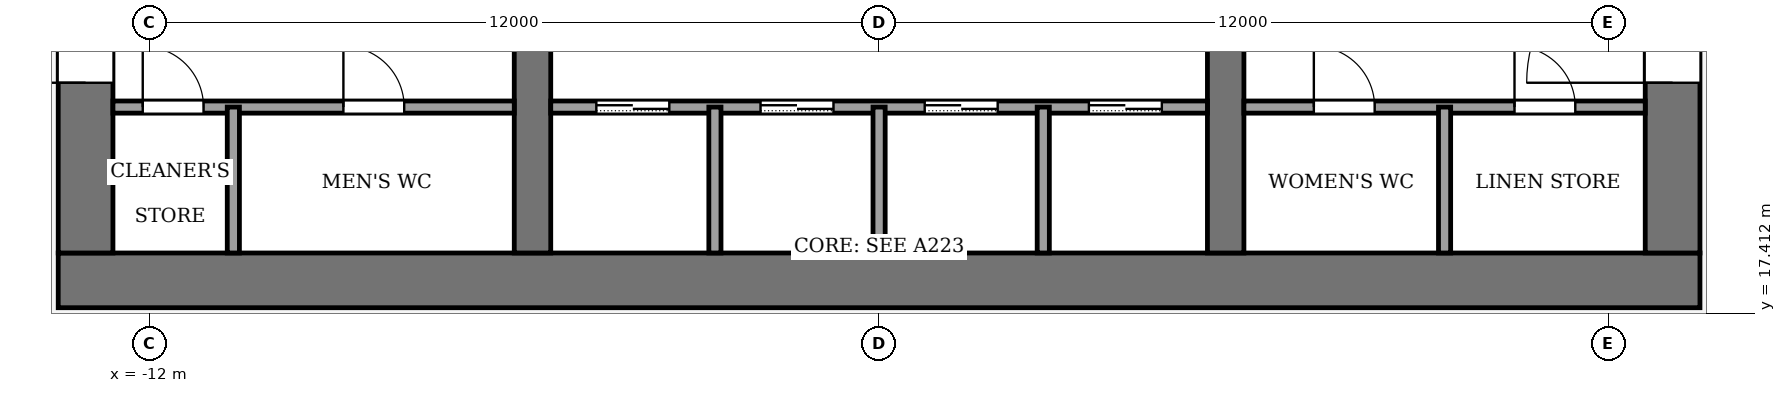
"""IFC4 building model, lengths in metres.
Left out: names, types, materials, properties, quantities, classifications, styles, units other than length and angle.
Written with IfcOpenShell. Run it as: python <this file> out.ifc"""

import sys

from ifc_helpers import new_model, si_unit, direction, frame, frame_2d, origin, place, context, subcontext, project, spatial, rectangle, extrude, element, fill, save


model = new_model("IFC4")
c1 = context("Model", 3, precision=1e-05, world=origin(), true_north=direction((0.0, 1.0)))
c2 = subcontext(c1, "Body", "Model", "MODEL_VIEW")
j1 = project(units=[si_unit("LENGTHUNIT", "METRE"), si_unit("PLANEANGLEUNIT", "RADIAN")], contexts=[c1])
p1 = place(None, origin())
s1 = spatial("IfcSite", under=j1, at=p1, CompositionType="ELEMENT")
p2 = place(p1, origin())
s2 = spatial("IfcBuilding", under=s1, at=p2, CompositionType="ELEMENT")
p3 = place(p2, frame((0.0, 0.0, 214.0)))
s3 = spatial("IfcBuildingStorey", under=s2, at=p3, CompositionType="ELEMENT", Elevation=214.0)
p4 = place(p3, frame((-13.5, 17.95, -0.13), z_axis=(0.0, 0.0, 1.0), x_axis=(1.0, 0.0, 0.0)))
e1 = element("IfcWall", 1, at=p4, inside=s3, PredefinedType="SHEAR", context=c2, shape_type="SweptSolid", body=[
    extrude(rectangle(XDim=27.0, YDim=0.9, at=frame_2d((13.5, 0.0))), origin(), (0.0, 0.0, 1.0), 4.0),
])
p5 = place(p3, frame((-13.05, 18.4, -0.13), z_axis=(0.0, 0.0, 1.0), x_axis=(0.0, 1.0, 0.0)))
e2 = element("IfcWall", 2, at=p5, inside=s3, PredefinedType="SHEAR", context=c2, shape_type="SweptSolid", body=[
    extrude(rectangle(XDim=19.2, YDim=0.9, at=frame_2d((9.6, 0.0))), origin(), (0.0, 0.0, 1.0), 4.0),
])
p6 = place(p5, frame((2.8, 0.0, 0.13)))
e3 = element("IfcOpeningElement", 3, at=p6, cuts=e2, PredefinedType="OPENING", context=c2, shape_type="SweptSolid", body=[
    extrude(rectangle(XDim=2.4, YDim=2.4, at=frame_2d((1.2, 1.2))), frame((0.0, 0.46, 0.0), z_axis=(0.0, -1.0, 0.0), x_axis=(1.0, 0.0, 0.0)), (0.0, 0.0, 1.0), 0.92),
])
p7 = place(p5, frame((13.4, 0.0, 0.13)))
e4 = element("IfcOpeningElement", 4, at=p7, cuts=e2, PredefinedType="OPENING", context=c2, shape_type="SweptSolid", body=[
    extrude(rectangle(XDim=1.4, YDim=2.2, at=frame_2d((0.7, 1.1))), frame((0.0, 0.46, 0.0), z_axis=(0.0, -1.0, 0.0), x_axis=(1.0, 0.0, 0.0)), (0.0, 0.0, 1.0), 0.92),
])
p8 = place(p3, frame((13.05, 18.4, -0.13), z_axis=(0.0, 0.0, 1.0), x_axis=(0.0, 1.0, 0.0)))
e5 = element("IfcWall", 5, at=p8, inside=s3, PredefinedType="SHEAR", context=c2, shape_type="SweptSolid", body=[
    extrude(rectangle(XDim=19.2, YDim=0.9, at=frame_2d((9.6, 0.0))), origin(), (0.0, 0.0, 1.0), 4.0),
])
p9 = place(p8, frame((2.8, 0.0, 0.13)))
e6 = element("IfcOpeningElement", 6, at=p9, cuts=e5, PredefinedType="OPENING", context=c2, shape_type="SweptSolid", body=[
    extrude(rectangle(XDim=2.4, YDim=2.4, at=frame_2d((1.2, 1.2))), frame((0.0, 0.46, 0.0), z_axis=(0.0, -1.0, 0.0), x_axis=(1.0, 0.0, 0.0)), (0.0, 0.0, 1.0), 0.92),
])
p10 = place(p8, frame((13.3, 0.0, 0.13)))
e7 = element("IfcOpeningElement", 7, at=p10, cuts=e5, PredefinedType="OPENING", context=c2, shape_type="SweptSolid", body=[
    extrude(rectangle(XDim=2.4, YDim=2.4, at=frame_2d((1.2, 1.2))), frame((0.0, 0.46, 0.0), z_axis=(0.0, -1.0, 0.0), x_axis=(1.0, 0.0, 0.0)), (0.0, 0.0, 1.0), 0.92),
])
p11 = place(p3, frame((-5.7, 18.4, -0.13), z_axis=(0.0, 0.0, 1.0), x_axis=(0.0, 1.0, 0.0)))
e8 = element("IfcWall", 8, at=p11, inside=s3, PredefinedType="SHEAR", context=c2, shape_type="SweptSolid", body=[
    extrude(rectangle(XDim=19.2, YDim=0.6, at=frame_2d((9.6, 0.0))), origin(), (0.0, 0.0, 1.0), 4.0),
])
p12 = place(p11, frame((8.35, 0.0, 0.13)))
e9 = element("IfcOpeningElement", 9, at=p12, cuts=e8, PredefinedType="OPENING", context=c2, shape_type="SweptSolid", body=[
    extrude(rectangle(XDim=0.9, YDim=2.1, at=frame_2d((0.45, 1.05))), frame((0.0, 0.31, 0.0), z_axis=(0.0, -1.0, 0.0), x_axis=(1.0, 0.0, 0.0)), (0.0, 0.0, 1.0), 0.62),
])
p13 = place(p3, frame((5.7, 18.4, -0.13), z_axis=(0.0, 0.0, 1.0), x_axis=(0.0, 1.0, 0.0)))
e10 = element("IfcWall", 10, at=p13, inside=s3, PredefinedType="SHEAR", context=c2, shape_type="SweptSolid", body=[
    extrude(rectangle(XDim=19.2, YDim=0.6, at=frame_2d((9.6, 0.0))), origin(), (0.0, 0.0, 1.0), 4.0),
])
p14 = place(p13, frame((13.3, 0.0, 0.13)))
e11 = element("IfcOpeningElement", 11, at=p14, cuts=e10, PredefinedType="OPENING", context=c2, shape_type="SweptSolid", body=[
    extrude(rectangle(XDim=2.4, YDim=2.4, at=frame_2d((1.2, 1.2))), frame((0.0, 0.31, 0.0), z_axis=(0.0, -1.0, 0.0), x_axis=(1.0, 0.0, 0.0)), (0.0, 0.0, 1.0), 0.62),
])
p15 = place(p3, frame((-12.6, 20.8, 0.0), z_axis=(0.0, 0.0, 1.0), x_axis=(1.0, 0.0, 0.0)))
e12 = element("IfcWall", 12, at=p15, inside=s3, PredefinedType="PARTITIONING", context=c2, shape_type="SweptSolid", body=[
    extrude(rectangle(XDim=6.6, YDim=0.2, at=frame_2d((3.3, 0.0))), origin(), (0.0, 0.0, 1.0), 3.87),
])
p16 = place(p15, frame((0.49, 0.0, 0.0)))
e13 = element("IfcOpeningElement", 13, at=p16, cuts=e12, PredefinedType="OPENING", context=c2, shape_type="SweptSolid", body=[
    extrude(rectangle(XDim=1.0, YDim=2.1, at=frame_2d((0.5, 1.05))), frame((0.0, 0.11, 0.0), z_axis=(0.0, -1.0, 0.0), x_axis=(1.0, 0.0, 0.0)), (0.0, 0.0, 1.0), 0.22),
])
p17 = place(p15, frame((3.79, 0.0, 0.0)))
e14 = element("IfcOpeningElement", 14, at=p17, cuts=e12, PredefinedType="OPENING", context=c2, shape_type="SweptSolid", body=[
    extrude(rectangle(XDim=1.0, YDim=2.1, at=frame_2d((0.5, 1.05))), frame((0.0, 0.11, 0.0), z_axis=(0.0, -1.0, 0.0), x_axis=(1.0, 0.0, 0.0)), (0.0, 0.0, 1.0), 0.22),
])
p18 = place(p3, frame((-5.4, 20.8, 0.0), z_axis=(0.0, 0.0, 1.0), x_axis=(1.0, 0.0, 0.0)))
e15 = element("IfcWall", 15, at=p18, inside=s3, PredefinedType="PARTITIONING", context=c2, shape_type="SweptSolid", body=[
    extrude(rectangle(XDim=10.8, YDim=0.2, at=frame_2d((5.4, 0.0))), origin(), (0.0, 0.0, 1.0), 3.87),
])
p19 = place(p18, frame((0.75, 0.0, 0.0)))
e16 = element("IfcOpeningElement", 16, at=p19, cuts=e15, PredefinedType="OPENING", context=c2, shape_type="SweptSolid", body=[
    extrude(rectangle(XDim=1.2, YDim=2.2, at=frame_2d((0.6, 1.1))), frame((0.0, 0.11, 0.0), z_axis=(0.0, -1.0, 0.0), x_axis=(1.0, 0.0, 0.0)), (0.0, 0.0, 1.0), 0.22),
])
p20 = place(p18, frame((3.45, 0.0, 0.0)))
e17 = element("IfcOpeningElement", 17, at=p20, cuts=e15, PredefinedType="OPENING", context=c2, shape_type="SweptSolid", body=[
    extrude(rectangle(XDim=1.2, YDim=2.2, at=frame_2d((0.6, 1.1))), frame((0.0, 0.11, 0.0), z_axis=(0.0, -1.0, 0.0), x_axis=(1.0, 0.0, 0.0)), (0.0, 0.0, 1.0), 0.22),
])
p21 = place(p18, frame((6.15, 0.0, 0.0)))
e18 = element("IfcOpeningElement", 18, at=p21, cuts=e15, PredefinedType="OPENING", context=c2, shape_type="SweptSolid", body=[
    extrude(rectangle(XDim=1.2, YDim=2.2, at=frame_2d((0.6, 1.1))), frame((0.0, 0.11, 0.0), z_axis=(0.0, -1.0, 0.0), x_axis=(1.0, 0.0, 0.0)), (0.0, 0.0, 1.0), 0.22),
])
p22 = place(p18, frame((8.85, 0.0, 0.0)))
e19 = element("IfcOpeningElement", 19, at=p22, cuts=e15, PredefinedType="OPENING", context=c2, shape_type="SweptSolid", body=[
    extrude(rectangle(XDim=1.2, YDim=2.2, at=frame_2d((0.6, 1.1))), frame((0.0, 0.11, 0.0), z_axis=(0.0, -1.0, 0.0), x_axis=(1.0, 0.0, 0.0)), (0.0, 0.0, 1.0), 0.22),
])
p23 = place(p3, frame((6.0, 20.8, 0.0), z_axis=(0.0, 0.0, 1.0), x_axis=(1.0, 0.0, 0.0)))
e20 = element("IfcWall", 20, at=p23, inside=s3, PredefinedType="PARTITIONING", context=c2, shape_type="SweptSolid", body=[
    extrude(rectangle(XDim=6.6, YDim=0.2, at=frame_2d((3.3, 0.0))), origin(), (0.0, 0.0, 1.0), 3.87),
])
p24 = place(p23, frame((1.15, 0.0, 0.0)))
e21 = element("IfcOpeningElement", 21, at=p24, cuts=e20, PredefinedType="OPENING", context=c2, shape_type="SweptSolid", body=[
    extrude(rectangle(XDim=1.0, YDim=2.1, at=frame_2d((0.5, 1.05))), frame((0.0, 0.11, 0.0), z_axis=(0.0, -1.0, 0.0), x_axis=(1.0, 0.0, 0.0)), (0.0, 0.0, 1.0), 0.22),
])
p25 = place(p23, frame((4.45, 0.0, 0.0)))
e22 = element("IfcOpeningElement", 22, at=p25, cuts=e20, PredefinedType="OPENING", context=c2, shape_type="SweptSolid", body=[
    extrude(rectangle(XDim=1.0, YDim=2.1, at=frame_2d((0.5, 1.05))), frame((0.0, 0.11, 0.0), z_axis=(0.0, -1.0, 0.0), x_axis=(1.0, 0.0, 0.0)), (0.0, 0.0, 1.0), 0.22),
])
for number, where, z_axis, x_axis in (
    (23, (-10.62, 18.4, 0.0), (0.0, 0.0, 1.0), (0.0, 1.0, 0.0)),
    (24, (-2.7, 18.4, 0.0), (0.0, 0.0, 1.0), (0.0, 1.0, 0.0)),
    (25, (0.0, 18.4, 0.0), (0.0, 0.0, 1.0), (0.0, 1.0, 0.0)),
    (26, (2.7, 18.4, 0.0), (0.0, 0.0, 1.0), (0.0, 1.0, 0.0)),
    (27, (9.3, 18.4, 0.0), (0.0, 0.0, 1.0), (0.0, 1.0, 0.0)),
):
    element("IfcWall", number, at=place(p3, frame(where, z_axis=z_axis, x_axis=x_axis)), inside=s3, PredefinedType="PARTITIONING", context=c2, shape_type="SweptSolid", body=[
        extrude(rectangle(XDim=2.4, YDim=0.2, at=frame_2d((1.2, 0.0))), origin(), (0.0, 0.0, 1.0), 3.87),
    ])
p26 = place(p19, origin())
e28 = element("IfcDoor", 28, at=p26, inside=s3, OperationType="SLIDING_TO_LEFT", PredefinedType="DOOR", context=c2, shape_type="SweptSolid", body=[
    extrude(rectangle(XDim=1.2, YDim=2.2, at=frame_2d((0.6, 1.1))), frame((0.0, 0.025, 0.0), z_axis=(0.0, -1.0, 0.0), x_axis=(1.0, 0.0, 0.0)), (0.0, 0.0, 1.0), 0.05),
])
fill(e16, e28)
p27 = place(p20, origin())
e29 = element("IfcDoor", 29, at=p27, inside=s3, OperationType="SLIDING_TO_LEFT", PredefinedType="DOOR", context=c2, shape_type="SweptSolid", body=[
    extrude(rectangle(XDim=1.2, YDim=2.2, at=frame_2d((0.6, 1.1))), frame((0.0, 0.025, 0.0), z_axis=(0.0, -1.0, 0.0), x_axis=(1.0, 0.0, 0.0)), (0.0, 0.0, 1.0), 0.05),
])
fill(e17, e29)
p28 = place(p21, origin())
e30 = element("IfcDoor", 30, at=p28, inside=s3, OperationType="SLIDING_TO_LEFT", PredefinedType="DOOR", context=c2, shape_type="SweptSolid", body=[
    extrude(rectangle(XDim=1.2, YDim=2.2, at=frame_2d((0.6, 1.1))), frame((0.0, 0.025, 0.0), z_axis=(0.0, -1.0, 0.0), x_axis=(1.0, 0.0, 0.0)), (0.0, 0.0, 1.0), 0.05),
])
fill(e18, e30)
p29 = place(p22, origin())
e31 = element("IfcDoor", 31, at=p29, inside=s3, OperationType="SLIDING_TO_LEFT", PredefinedType="DOOR", context=c2, shape_type="SweptSolid", body=[
    extrude(rectangle(XDim=1.2, YDim=2.2, at=frame_2d((0.6, 1.1))), frame((0.0, 0.025, 0.0), z_axis=(0.0, -1.0, 0.0), x_axis=(1.0, 0.0, 0.0)), (0.0, 0.0, 1.0), 0.05),
])
fill(e19, e31)
p30 = place(p16, origin())
e32 = element("IfcDoor", 32, at=p30, inside=s3, OperationType="SINGLE_SWING_RIGHT", PredefinedType="DOOR", context=c2, shape_type="SweptSolid", body=[
    extrude(rectangle(XDim=1.0, YDim=2.1, at=frame_2d((0.5, 1.05))), frame((0.0, 0.025, 0.0), z_axis=(0.0, -1.0, 0.0), x_axis=(1.0, 0.0, 0.0)), (0.0, 0.0, 1.0), 0.05),
])
fill(e13, e32)
p31 = place(p17, origin())
e33 = element("IfcDoor", 33, at=p31, inside=s3, OperationType="SINGLE_SWING_RIGHT", PredefinedType="DOOR", context=c2, shape_type="SweptSolid", body=[
    extrude(rectangle(XDim=1.0, YDim=2.1, at=frame_2d((0.5, 1.05))), frame((0.0, 0.025, 0.0), z_axis=(0.0, -1.0, 0.0), x_axis=(1.0, 0.0, 0.0)), (0.0, 0.0, 1.0), 0.05),
])
fill(e14, e33)
p32 = place(p24, origin())
e34 = element("IfcDoor", 34, at=p32, inside=s3, OperationType="SINGLE_SWING_LEFT", PredefinedType="DOOR", context=c2, shape_type="SweptSolid", body=[
    extrude(rectangle(XDim=1.0, YDim=2.1, at=frame_2d((0.5, 1.05))), frame((0.0, 0.025, 0.0), z_axis=(0.0, -1.0, 0.0), x_axis=(1.0, 0.0, 0.0)), (0.0, 0.0, 1.0), 0.05),
])
fill(e21, e34)
p33 = place(p25, origin())
e35 = element("IfcDoor", 35, at=p33, inside=s3, OperationType="SINGLE_SWING_LEFT", PredefinedType="DOOR", context=c2, shape_type="SweptSolid", body=[
    extrude(rectangle(XDim=1.0, YDim=2.1, at=frame_2d((0.5, 1.05))), frame((0.0, 0.025, 0.0), z_axis=(0.0, -1.0, 0.0), x_axis=(1.0, 0.0, 0.0)), (0.0, 0.0, 1.0), 0.05),
])
fill(e22, e35)
p34 = place(p6, origin())
e36 = element("IfcDoor", 36, at=p34, inside=s3, OperationType="DOUBLE_DOOR_SINGLE_SWING", PredefinedType="DOOR", context=c2, shape_type="SweptSolid", body=[
    extrude(rectangle(XDim=2.4, YDim=2.4, at=frame_2d((1.2, 1.2))), frame((0.0, 0.025, 0.0), z_axis=(0.0, -1.0, 0.0), x_axis=(1.0, 0.0, 0.0)), (0.0, 0.0, 1.0), 0.05),
])
fill(e3, e36)
p35 = place(p9, origin())
e37 = element("IfcDoor", 37, at=p35, inside=s3, OperationType="DOUBLE_DOOR_SINGLE_SWING", PredefinedType="DOOR", context=c2, shape_type="SweptSolid", body=[
    extrude(rectangle(XDim=2.4, YDim=2.4, at=frame_2d((1.2, 1.2))), frame((0.0, 0.025, 0.0), z_axis=(0.0, -1.0, 0.0), x_axis=(1.0, 0.0, 0.0)), (0.0, 0.0, 1.0), 0.05),
])
fill(e6, e37)
save(model, sys.argv[1])
